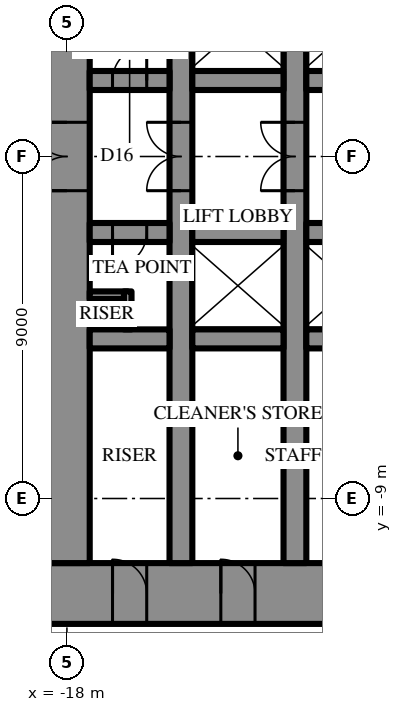
"""IFC4 building model, lengths in metres.
Left out: names, types, materials, properties, quantities, classifications, styles, units other than length and angle.
Written with IfcOpenShell. Run it as: python <this file> out.ifc"""

import sys

from ifc_helpers import new_model, si_unit, direction, frame, frame_2d, origin, place, context, subcontext, project, spatial, rectangle, extrude, element, fill, save


model = new_model("IFC4")
c1 = context("Model", 3, precision=1e-05, world=origin(), true_north=direction((0.0, 1.0)))
c2 = subcontext(c1, "Body", "Model", "MODEL_VIEW")
j1 = project(units=[si_unit("LENGTHUNIT", "METRE"), si_unit("PLANEANGLEUNIT", "RADIAN")], contexts=[c1])
p1 = place(None, origin())
s1 = spatial("IfcSite", under=j1, at=p1, CompositionType="ELEMENT")
p2 = place(p1, origin())
s2 = spatial("IfcBuilding", under=s1, at=p2, CompositionType="ELEMENT")
p3 = place(p2, frame((0.0, 0.0, 169.9)))
s3 = spatial("IfcBuildingStorey", under=s2, at=p3, CompositionType="ELEMENT", Elevation=169.9)
p4 = place(p3, frame((18.6, -11.5, 0.0), z_axis=(0.0, 0.0, 1.0), x_axis=(-1.0, 0.0, 0.0)))
e1 = element("IfcWall", 1, at=p4, inside=s3, PredefinedType="SHEAR", context=c2, shape_type="SweptSolid", body=[
    extrude(rectangle(XDim=37.2, YDim=1.6, at=frame_2d((18.6, 0.0))), origin(), (0.0, 0.0, 1.0), 4.2),
])
p5 = place(p4, frame((19.45, 0.0, 0.0)))
e2 = element("IfcOpeningElement", 2, at=p5, cuts=e1, PredefinedType="OPENING", context=c2, shape_type="SweptSolid", body=[
    extrude(rectangle(XDim=0.9, YDim=2.2, at=frame_2d((0.45, 1.1))), frame((0.0, 0.81, 0.0), z_axis=(0.0, -1.0, 0.0), x_axis=(1.0, 0.0, 0.0)), (0.0, 0.0, 1.0), 1.62),
])
p6 = place(p4, frame((22.45, 0.0, 0.0)))
e3 = element("IfcOpeningElement", 3, at=p6, cuts=e1, PredefinedType="OPENING", context=c2, shape_type="SweptSolid", body=[
    extrude(rectangle(XDim=0.9, YDim=2.2, at=frame_2d((0.45, 1.1))), frame((0.0, 0.81, 0.0), z_axis=(0.0, -1.0, 0.0), x_axis=(1.0, 0.0, 0.0)), (0.0, 0.0, 1.0), 1.62),
])
p7 = place(p4, frame((25.5, 0.0, 0.0)))
e4 = element("IfcOpeningElement", 4, at=p7, cuts=e1, PredefinedType="OPENING", context=c2, shape_type="SweptSolid", body=[
    extrude(rectangle(XDim=1.0, YDim=2.2, at=frame_2d((0.5, 1.1))), frame((0.0, 0.81, 0.0), z_axis=(0.0, -1.0, 0.0), x_axis=(1.0, 0.0, 0.0)), (0.0, 0.0, 1.0), 1.62),
])
p8 = place(p4, frame((1.8, 0.0, 0.0)))
e5 = element("IfcOpeningElement", 5, at=p8, cuts=e1, PredefinedType="OPENING", context=c2, shape_type="SweptSolid", body=[
    extrude(rectangle(XDim=0.9, YDim=2.2, at=frame_2d((0.45, 1.1))), frame((0.0, 0.81, 0.0), z_axis=(0.0, -1.0, 0.0), x_axis=(1.0, 0.0, 0.0)), (0.0, 0.0, 1.0), 1.62),
])
p9 = place(p4, frame((4.65, 0.0, 0.0)))
e6 = element("IfcOpeningElement", 6, at=p9, cuts=e1, PredefinedType="OPENING", context=c2, shape_type="SweptSolid", body=[
    extrude(rectangle(XDim=0.9, YDim=2.2, at=frame_2d((0.45, 1.1))), frame((0.0, 0.81, 0.0), z_axis=(0.0, -1.0, 0.0), x_axis=(1.0, 0.0, 0.0)), (0.0, 0.0, 1.0), 1.62),
])
p10 = place(p4, frame((7.75, 0.0, 0.0)))
e7 = element("IfcOpeningElement", 7, at=p10, cuts=e1, PredefinedType="OPENING", context=c2, shape_type="SweptSolid", body=[
    extrude(rectangle(XDim=0.9, YDim=2.2, at=frame_2d((0.45, 1.1))), frame((0.0, 0.81, 0.0), z_axis=(0.0, -1.0, 0.0), x_axis=(1.0, 0.0, 0.0)), (0.0, 0.0, 1.0), 1.62),
])
p11 = place(p4, frame((28.55, 0.0, 0.0)))
e8 = element("IfcOpeningElement", 8, at=p11, cuts=e1, PredefinedType="OPENING", context=c2, shape_type="SweptSolid", body=[
    extrude(rectangle(XDim=0.9, YDim=2.2, at=frame_2d((0.45, 1.1))), frame((0.0, 0.81, 0.0), z_axis=(0.0, -1.0, 0.0), x_axis=(1.0, 0.0, 0.0)), (0.0, 0.0, 1.0), 1.62),
])
p12 = place(p4, frame((31.65, 0.0, 0.0)))
e9 = element("IfcOpeningElement", 9, at=p12, cuts=e1, PredefinedType="OPENING", context=c2, shape_type="SweptSolid", body=[
    extrude(rectangle(XDim=0.9, YDim=2.2, at=frame_2d((0.45, 1.1))), frame((0.0, 0.81, 0.0), z_axis=(0.0, -1.0, 0.0), x_axis=(1.0, 0.0, 0.0)), (0.0, 0.0, 1.0), 1.62),
])
p13 = place(p4, frame((34.5, 0.0, 0.0)))
e10 = element("IfcOpeningElement", 10, at=p13, cuts=e1, PredefinedType="OPENING", context=c2, shape_type="SweptSolid", body=[
    extrude(rectangle(XDim=0.9, YDim=2.2, at=frame_2d((0.45, 1.1))), frame((0.0, 0.81, 0.0), z_axis=(0.0, -1.0, 0.0), x_axis=(1.0, 0.0, 0.0)), (0.0, 0.0, 1.0), 1.62),
])
p14 = place(p3, frame((-18.0, 10.7, 0.0), z_axis=(0.0, 0.0, 1.0), x_axis=(0.0, -1.0, 0.0)))
e11 = element("IfcWall", 11, at=p14, inside=s3, PredefinedType="SHEAR", context=c2, shape_type="SweptSolid", body=[
    extrude(rectangle(XDim=21.4, YDim=1.2, at=frame_2d((10.7, 0.0))), origin(), (0.0, 0.0, 1.0), 4.2),
])
p15 = place(p14, frame((9.8, 0.0, 0.0)))
e12 = element("IfcOpeningElement", 12, at=p15, cuts=e11, PredefinedType="OPENING", context=c2, shape_type="SweptSolid", body=[
    extrude(rectangle(XDim=1.8, YDim=2.4, at=frame_2d((0.9, 1.2))), frame((0.0, 0.61, 0.0), z_axis=(0.0, -1.0, 0.0), x_axis=(1.0, 0.0, 0.0)), (0.0, 0.0, 1.0), 1.22),
])
p16 = place(p3, frame((-12.0, -10.7, 0.0), z_axis=(0.0, 0.0, 1.0), x_axis=(0.0, 1.0, 0.0)))
e13 = element("IfcWall", 13, at=p16, inside=s3, PredefinedType="SHEAR", context=c2, shape_type="SweptSolid", body=[
    extrude(rectangle(XDim=21.4, YDim=0.6, at=frame_2d((10.7, 0.0))), origin(), (0.0, 0.0, 1.0), 4.2),
])
p17 = place(p16, frame((9.8, 0.0, 0.0)))
e14 = element("IfcOpeningElement", 14, at=p17, cuts=e13, PredefinedType="OPENING", context=c2, shape_type="SweptSolid", body=[
    extrude(rectangle(XDim=1.8, YDim=2.4, at=frame_2d((0.9, 1.2))), frame((0.0, 0.31, 0.0), z_axis=(0.0, -1.0, 0.0), x_axis=(1.0, 0.0, 0.0)), (0.0, 0.0, 1.0), 0.62),
])
p18 = place(p3, frame((-15.0, -10.7, 0.0), z_axis=(0.0, 0.0, 1.0), x_axis=(0.0, 1.0, 0.0)))
e15 = element("IfcWall", 15, at=p18, inside=s3, PredefinedType="SHEAR", context=c2, shape_type="SweptSolid", body=[
    extrude(rectangle(XDim=21.4, YDim=0.6, at=frame_2d((10.7, 0.0))), origin(), (0.0, 0.0, 1.0), 4.2),
])
p19 = place(p18, frame((9.8, 0.0, 0.0)))
e16 = element("IfcOpeningElement", 16, at=p19, cuts=e15, PredefinedType="OPENING", context=c2, shape_type="SweptSolid", body=[
    extrude(rectangle(XDim=1.8, YDim=2.4, at=frame_2d((0.9, 1.2))), frame((0.0, 0.31, 0.0), z_axis=(0.0, -1.0, 0.0), x_axis=(1.0, 0.0, 0.0)), (0.0, 0.0, 1.0), 0.62),
])
p20 = place(p3, frame((-17.4, 2.0, 0.0), z_axis=(0.0, 0.0, 1.0), x_axis=(1.0, 0.0, 0.0)))
e17 = element("IfcWall", 17, at=p20, inside=s3, PredefinedType="SHEAR", context=c2, shape_type="SweptSolid", body=[
    extrude(rectangle(XDim=2.1, YDim=0.5, at=frame_2d((1.05, 0.0))), origin(), (0.0, 0.0, 1.0), 4.2),
])
p21 = place(p20, frame((0.6, 0.0, 0.0)))
e18 = element("IfcOpeningElement", 18, at=p21, cuts=e17, PredefinedType="OPENING", context=c2, shape_type="SweptSolid", body=[
    extrude(rectangle(XDim=0.9, YDim=2.2, at=frame_2d((0.45, 1.1))), frame((0.0, 0.26, 0.0), z_axis=(0.0, -1.0, 0.0), x_axis=(1.0, 0.0, 0.0)), (0.0, 0.0, 1.0), 0.52),
])
p22 = place(p3, frame((-14.7, 2.0, 0.0), z_axis=(0.0, 0.0, 1.0), x_axis=(1.0, 0.0, 0.0)))
e19 = element("IfcWall", 19, at=p22, inside=s3, PredefinedType="SHEAR", context=c2, shape_type="SweptSolid", body=[
    extrude(rectangle(XDim=2.4, YDim=0.5, at=frame_2d((1.2, 0.0))), origin(), (0.0, 0.0, 1.0), 4.2),
])
p23 = place(p3, frame((-11.7, 2.0, 0.0), z_axis=(0.0, 0.0, 1.0), x_axis=(1.0, 0.0, 0.0)))
e20 = element("IfcWall", 20, at=p23, inside=s3, PredefinedType="SHEAR", context=c2, shape_type="SweptSolid", body=[
    extrude(rectangle(XDim=5.9, YDim=0.5, at=frame_2d((2.95, 0.0))), origin(), (0.0, 0.0, 1.0), 4.2),
])
p24 = place(p3, frame((3.2, -2.0, 0.0), z_axis=(0.0, 0.0, 1.0), x_axis=(-1.0, 0.0, 0.0)))
e21 = element("IfcWall", 21, at=p24, inside=s3, PredefinedType="SHEAR", context=c2, shape_type="SweptSolid", body=[
    extrude(rectangle(XDim=14.9, YDim=0.5, at=frame_2d((7.45, 0.0))), origin(), (0.0, 0.0, 1.0), 4.2),
])
p25 = place(p24, frame((1.15, 0.0, 0.0)))
e22 = element("IfcOpeningElement", 22, at=p25, cuts=e21, PredefinedType="OPENING", context=c2, shape_type="SweptSolid", body=[
    extrude(rectangle(XDim=1.1, YDim=2.2, at=frame_2d((0.55, 1.1))), frame((0.0, 0.26, 0.0), z_axis=(0.0, -1.0, 0.0), x_axis=(1.0, 0.0, 0.0)), (0.0, 0.0, 1.0), 0.52),
])
p26 = place(p24, frame((4.15, 0.0, 0.0)))
e23 = element("IfcOpeningElement", 23, at=p26, cuts=e21, PredefinedType="OPENING", context=c2, shape_type="SweptSolid", body=[
    extrude(rectangle(XDim=1.1, YDim=2.2, at=frame_2d((0.55, 1.1))), frame((0.0, 0.26, 0.0), z_axis=(0.0, -1.0, 0.0), x_axis=(1.0, 0.0, 0.0)), (0.0, 0.0, 1.0), 0.52),
])
p27 = place(p24, frame((7.15, 0.0, 0.0)))
e24 = element("IfcOpeningElement", 24, at=p27, cuts=e21, PredefinedType="OPENING", context=c2, shape_type="SweptSolid", body=[
    extrude(rectangle(XDim=1.1, YDim=2.2, at=frame_2d((0.55, 1.1))), frame((0.0, 0.26, 0.0), z_axis=(0.0, -1.0, 0.0), x_axis=(1.0, 0.0, 0.0)), (0.0, 0.0, 1.0), 0.52),
])
p28 = place(p24, frame((10.15, 0.0, 0.0)))
e25 = element("IfcOpeningElement", 25, at=p28, cuts=e21, PredefinedType="OPENING", context=c2, shape_type="SweptSolid", body=[
    extrude(rectangle(XDim=1.1, YDim=2.2, at=frame_2d((0.55, 1.1))), frame((0.0, 0.26, 0.0), z_axis=(0.0, -1.0, 0.0), x_axis=(1.0, 0.0, 0.0)), (0.0, 0.0, 1.0), 0.52),
])
p29 = place(p3, frame((-12.3, -2.0, 0.0), z_axis=(0.0, 0.0, 1.0), x_axis=(-1.0, 0.0, 0.0)))
e26 = element("IfcWall", 26, at=p29, inside=s3, PredefinedType="SHEAR", context=c2, shape_type="SweptSolid", body=[
    extrude(rectangle(XDim=2.4, YDim=0.5, at=frame_2d((1.2, 0.0))), origin(), (0.0, 0.0, 1.0), 4.2),
])
p30 = place(p3, frame((-15.3, -2.0, 0.0), z_axis=(0.0, 0.0, 1.0), x_axis=(-1.0, 0.0, 0.0)))
e27 = element("IfcWall", 27, at=p30, inside=s3, PredefinedType="SHEAR", context=c2, shape_type="SweptSolid", body=[
    extrude(rectangle(XDim=2.1, YDim=0.5, at=frame_2d((1.05, 0.0))), origin(), (0.0, 0.0, 1.0), 4.2),
])
p31 = place(p30, frame((0.6, 0.0, 0.0)))
e28 = element("IfcOpeningElement", 28, at=p31, cuts=e27, PredefinedType="OPENING", context=c2, shape_type="SweptSolid", body=[
    extrude(rectangle(XDim=0.9, YDim=2.2, at=frame_2d((0.45, 1.1))), frame((0.0, 0.26, 0.0), z_axis=(0.0, -1.0, 0.0), x_axis=(1.0, 0.0, 0.0)), (0.0, 0.0, 1.0), 0.52),
])
p32 = place(p3, frame((11.7, -4.8, 0.0), z_axis=(0.0, 0.0, 1.0), x_axis=(-1.0, 0.0, 0.0)))
e29 = element("IfcWall", 29, at=p32, inside=s3, PredefinedType="SHEAR", context=c2, shape_type="SweptSolid", body=[
    extrude(rectangle(XDim=23.4, YDim=0.5, at=frame_2d((11.7, 0.0))), origin(), (0.0, 0.0, 1.0), 4.2),
])
p33 = place(p32, frame((6.6, 0.0, 0.0)))
e30 = element("IfcOpeningElement", 30, at=p33, cuts=e29, PredefinedType="OPENING", context=c2, shape_type="SweptSolid", body=[
    extrude(rectangle(XDim=1.2, YDim=2.2, at=frame_2d((0.6, 1.1))), frame((0.0, 0.26, 0.0), z_axis=(0.0, -1.0, 0.0), x_axis=(1.0, 0.0, 0.0)), (0.0, 0.0, 1.0), 0.52),
])
p34 = place(p32, frame((3.6, 0.0, 0.0)))
e31 = element("IfcOpeningElement", 31, at=p34, cuts=e29, PredefinedType="OPENING", context=c2, shape_type="SweptSolid", body=[
    extrude(rectangle(XDim=1.2, YDim=2.2, at=frame_2d((0.6, 1.1))), frame((0.0, 0.26, 0.0), z_axis=(0.0, -1.0, 0.0), x_axis=(1.0, 0.0, 0.0)), (0.0, 0.0, 1.0), 0.52),
])
p35 = place(p3, frame((-12.3, -4.8, 0.0), z_axis=(0.0, 0.0, 1.0), x_axis=(-1.0, 0.0, 0.0)))
e32 = element("IfcWall", 32, at=p35, inside=s3, PredefinedType="SHEAR", context=c2, shape_type="SweptSolid", body=[
    extrude(rectangle(XDim=2.4, YDim=0.5, at=frame_2d((1.2, 0.0))), origin(), (0.0, 0.0, 1.0), 4.2),
])
p36 = place(p3, frame((-15.3, -4.8, 0.0), z_axis=(0.0, 0.0, 1.0), x_axis=(-1.0, 0.0, 0.0)))
e33 = element("IfcWall", 33, at=p36, inside=s3, PredefinedType="SHEAR", context=c2, shape_type="SweptSolid", body=[
    extrude(rectangle(XDim=2.1, YDim=0.5, at=frame_2d((1.05, 0.0))), origin(), (0.0, 0.0, 1.0), 4.2),
])
for number, where, z_axis, x_axis in (
    (34, (-16.4, -3.65, 0.0), (0.0, 0.0, 1.0), (-1.0, 0.0, 0.0)),
    (35, (-16.4, -3.55, 0.0), (0.0, 0.0, 1.0), (0.0, -1.0, 0.0)),
):
    element("IfcWall", number, at=place(p3, frame(where, z_axis=z_axis, x_axis=x_axis)), inside=s3, PredefinedType="PARTITIONING", context=c2, shape_type="SweptSolid", body=[
        extrude(rectangle(XDim=1.0, YDim=0.2, at=frame_2d((0.5, 0.0))), origin(), (0.0, 0.0, 1.0), 4.0),
    ])
p37 = place(p15, frame((1.8, 0.0, 0.0), z_axis=(0.0, 0.0, 1.0), x_axis=(-1.0, 0.0, 0.0)))
e36 = element("IfcDoor", 36, at=p37, inside=s3, OperationType="DOUBLE_DOOR_SINGLE_SWING", PredefinedType="DOOR", context=c2, shape_type="SweptSolid", body=[
    extrude(rectangle(XDim=1.8, YDim=2.4, at=frame_2d((0.9, 1.2))), frame((0.0, 0.025, 0.0), z_axis=(0.0, -1.0, 0.0), x_axis=(1.0, 0.0, 0.0)), (0.0, 0.0, 1.0), 0.05),
])
fill(e12, e36)
p38 = place(p12, frame((0.9, 0.0, 0.0), z_axis=(0.0, 0.0, 1.0), x_axis=(-1.0, 0.0, 0.0)))
e37 = element("IfcDoor", 37, at=p38, inside=s3, OperationType="SINGLE_SWING_RIGHT", PredefinedType="DOOR", context=c2, shape_type="SweptSolid", body=[
    extrude(rectangle(XDim=0.9, YDim=2.2, at=frame_2d((0.45, 1.1))), frame((0.0, 0.025, 0.0), z_axis=(0.0, -1.0, 0.0), x_axis=(1.0, 0.0, 0.0)), (0.0, 0.0, 1.0), 0.05),
])
fill(e9, e37)
p39 = place(p13, frame((0.9, 0.0, 0.0), z_axis=(0.0, 0.0, 1.0), x_axis=(-1.0, 0.0, 0.0)))
e38 = element("IfcDoor", 38, at=p39, inside=s3, OperationType="SINGLE_SWING_RIGHT", PredefinedType="DOOR", context=c2, shape_type="SweptSolid", body=[
    extrude(rectangle(XDim=0.9, YDim=2.2, at=frame_2d((0.45, 1.1))), frame((0.0, 0.025, 0.0), z_axis=(0.0, -1.0, 0.0), x_axis=(1.0, 0.0, 0.0)), (0.0, 0.0, 1.0), 0.05),
])
fill(e10, e38)
p40 = place(p21, origin())
e39 = element("IfcDoor", 39, at=p40, inside=s3, OperationType="SINGLE_SWING_LEFT", PredefinedType="DOOR", context=c2, shape_type="SweptSolid", body=[
    extrude(rectangle(XDim=0.9, YDim=2.2, at=frame_2d((0.45, 1.1))), frame((0.0, 0.025, 0.0), z_axis=(0.0, -1.0, 0.0), x_axis=(1.0, 0.0, 0.0)), (0.0, 0.0, 1.0), 0.05),
])
fill(e18, e39)
p41 = place(p31, origin())
e40 = element("IfcDoor", 40, at=p41, inside=s3, OperationType="SINGLE_SWING_LEFT", PredefinedType="DOOR", context=c2, shape_type="SweptSolid", body=[
    extrude(rectangle(XDim=0.9, YDim=2.2, at=frame_2d((0.45, 1.1))), frame((0.0, 0.025, 0.0), z_axis=(0.0, -1.0, 0.0), x_axis=(1.0, 0.0, 0.0)), (0.0, 0.0, 1.0), 0.05),
])
fill(e28, e40)
p42 = place(p17, origin())
e41 = element("IfcDoor", 41, at=p42, inside=s3, OperationType="DOUBLE_DOOR_SINGLE_SWING", PredefinedType="DOOR", context=c2, shape_type="SweptSolid", body=[
    extrude(rectangle(XDim=1.8, YDim=2.4, at=frame_2d((0.9, 1.2))), frame((0.0, 0.025, 0.0), z_axis=(0.0, -1.0, 0.0), x_axis=(1.0, 0.0, 0.0)), (0.0, 0.0, 1.0), 0.05),
])
fill(e14, e41)
p43 = place(p19, origin())
e42 = element("IfcDoor", 42, at=p43, inside=s3, OperationType="DOUBLE_DOOR_SINGLE_SWING", PredefinedType="DOOR", context=c2, shape_type="SweptSolid", body=[
    extrude(rectangle(XDim=1.8, YDim=2.4, at=frame_2d((0.9, 1.2))), frame((0.0, 0.025, 0.0), z_axis=(0.0, -1.0, 0.0), x_axis=(1.0, 0.0, 0.0)), (0.0, 0.0, 1.0), 0.05),
])
fill(e16, e42)
save(model, sys.argv[1])
